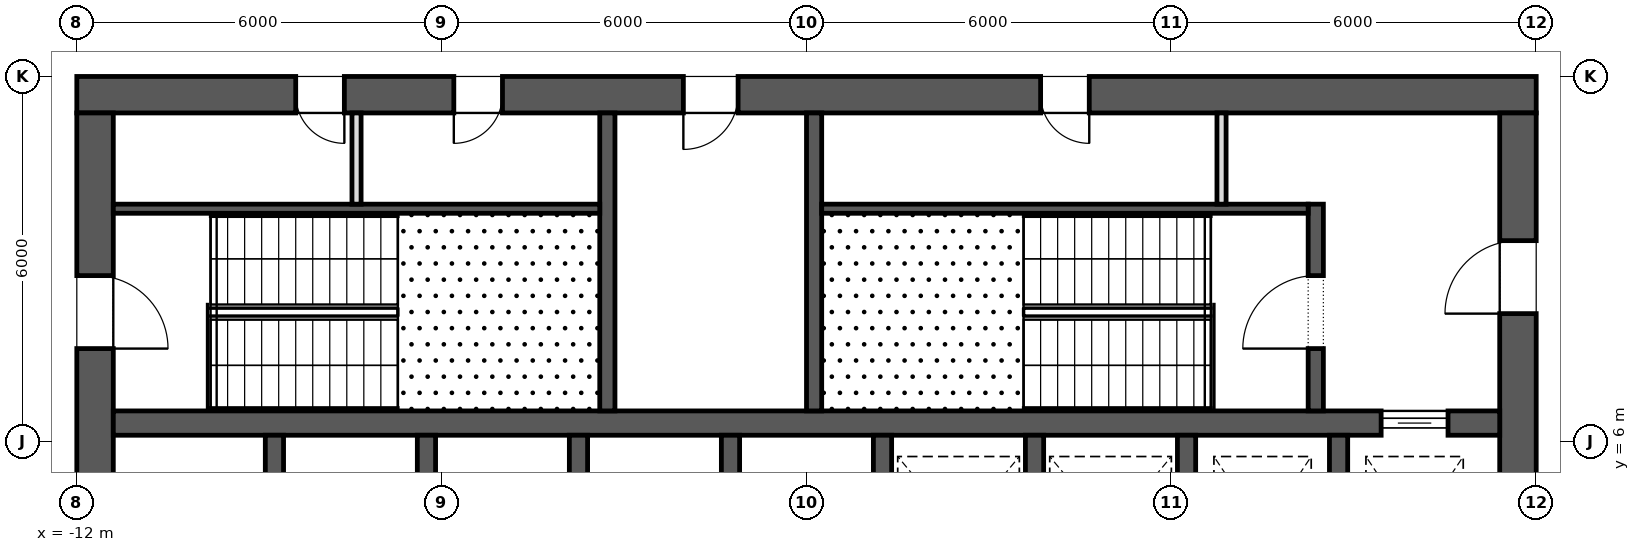
"""IFC4 building model, lengths in metres.
Left out: names, types, materials, properties, quantities, classifications, styles, units other than length and angle.
Written with IfcOpenShell. Run it as: python <this file> out.ifc"""

import sys

from ifc_helpers import new_model, si_unit, direction, frame, frame_2d, origin, place, context, subcontext, project, spatial, rectangle, extrude, element, fill, save


model = new_model("IFC4")
c1 = context("Model", 3, precision=1e-05, world=origin(), true_north=direction((0.0, 1.0)))
c2 = subcontext(c1, "Body", "Model", "MODEL_VIEW")
j1 = project(units=[si_unit("LENGTHUNIT", "METRE"), si_unit("PLANEANGLEUNIT", "RADIAN")], contexts=[c1])
p1 = place(None, origin())
s1 = spatial("IfcSite", under=j1, at=p1, CompositionType="ELEMENT")
p2 = place(p1, origin())
s2 = spatial("IfcBuilding", under=s1, at=p2, CompositionType="ELEMENT")
p3 = place(p2, frame((0.0, 0.0, 82.3)))
s3 = spatial("IfcBuildingStorey", under=s2, at=p3, CompositionType="ELEMENT", Elevation=82.3)
p4 = place(p3, frame((-12.0, 11.7, 0.0), z_axis=(0.0, 0.0, 1.0), x_axis=(1.0, 0.0, 0.0)))
e1 = element("IfcWall", 1, at=p4, inside=s3, PredefinedType="SHEAR", context=c2, shape_type="SweptSolid", body=[
    extrude(rectangle(XDim=24.0, YDim=0.6, at=frame_2d((12.0, 0.0))), origin(), (0.0, 0.0, 1.0), 4.2),
])
p5 = place(p4, frame((9.975, 0.0, 0.0)))
e2 = element("IfcOpeningElement", 2, at=p5, cuts=e1, PredefinedType="OPENING", context=c2, shape_type="SweptSolid", body=[
    extrude(rectangle(XDim=0.9, YDim=2.1, at=frame_2d((0.45, 1.05))), frame((0.0, 0.312, 0.0), z_axis=(0.0, -1.0, 0.0), x_axis=(1.0, 0.0, 0.0)), (0.0, 0.0, 1.0), 0.624),
])
p6 = place(p4, frame((3.6, 0.0, 0.0)))
e3 = element("IfcOpeningElement", 3, at=p6, cuts=e1, PredefinedType="OPENING", context=c2, shape_type="SweptSolid", body=[
    extrude(rectangle(XDim=0.8, YDim=2.1, at=frame_2d((0.4, 1.05))), frame((0.0, 0.312, 0.0), z_axis=(0.0, -1.0, 0.0), x_axis=(1.0, 0.0, 0.0)), (0.0, 0.0, 1.0), 0.624),
])
p7 = place(p4, frame((6.2, 0.0, 0.0)))
e4 = element("IfcOpeningElement", 4, at=p7, cuts=e1, PredefinedType="OPENING", context=c2, shape_type="SweptSolid", body=[
    extrude(rectangle(XDim=0.8, YDim=2.1, at=frame_2d((0.4, 1.05))), frame((0.0, 0.312, 0.0), z_axis=(0.0, -1.0, 0.0), x_axis=(1.0, 0.0, 0.0)), (0.0, 0.0, 1.0), 0.624),
])
p8 = place(p4, frame((15.85, 0.0, 0.0)))
e5 = element("IfcOpeningElement", 5, at=p8, cuts=e1, PredefinedType="OPENING", context=c2, shape_type="SweptSolid", body=[
    extrude(rectangle(XDim=0.8, YDim=2.1, at=frame_2d((0.4, 1.05))), frame((0.0, 0.312, 0.0), z_axis=(0.0, -1.0, 0.0), x_axis=(1.0, 0.0, 0.0)), (0.0, 0.0, 1.0), 0.624),
])
p9 = place(p3, frame((11.7, -11.4, 0.0), z_axis=(0.0, 0.0, 1.0), x_axis=(0.0, 1.0, 0.0)))
e6 = element("IfcWall", 6, at=p9, inside=s3, PredefinedType="SHEAR", context=c2, shape_type="SweptSolid", body=[
    extrude(rectangle(XDim=22.8, YDim=0.6, at=frame_2d((11.4, 0.0))), origin(), (0.0, 0.0, 1.0), 4.2),
])
p10 = place(p9, frame((10.2, 0.0, 0.0)))
e7 = element("IfcOpeningElement", 7, at=p10, cuts=e6, PredefinedType="OPENING", context=c2, shape_type="SweptSolid", body=[
    extrude(rectangle(XDim=2.4, YDim=2.1, at=frame_2d((1.2, 1.05))), frame((0.0, 0.312, 0.0), z_axis=(0.0, -1.0, 0.0), x_axis=(1.0, 0.0, 0.0)), (0.0, 0.0, 1.0), 0.624),
])
p11 = place(p9, frame((19.5, 0.0, 0.0)))
e8 = element("IfcOpeningElement", 8, at=p11, cuts=e6, PredefinedType="OPENING", context=c2, shape_type="SweptSolid", body=[
    extrude(rectangle(XDim=1.2, YDim=2.1, at=frame_2d((0.6, 1.05))), frame((0.0, 0.312, 0.0), z_axis=(0.0, -1.0, 0.0), x_axis=(1.0, 0.0, 0.0)), (0.0, 0.0, 1.0), 0.624),
])
p12 = place(p9, frame((2.1, 0.0, 0.0)))
e9 = element("IfcOpeningElement", 9, at=p12, cuts=e6, PredefinedType="OPENING", context=c2, shape_type="SweptSolid", body=[
    extrude(rectangle(XDim=1.2, YDim=2.1, at=frame_2d((0.6, 1.05))), frame((0.0, 0.312, 0.0), z_axis=(0.0, -1.0, 0.0), x_axis=(1.0, 0.0, 0.0)), (0.0, 0.0, 1.0), 0.624),
])
p13 = place(p3, frame((-11.7, -11.4, 0.0), z_axis=(0.0, 0.0, 1.0), x_axis=(0.0, 1.0, 0.0)))
e10 = element("IfcWall", 10, at=p13, inside=s3, PredefinedType="SHEAR", context=c2, shape_type="SweptSolid", body=[
    extrude(rectangle(XDim=22.8, YDim=0.6, at=frame_2d((11.4, 0.0))), origin(), (0.0, 0.0, 1.0), 4.2),
])
p14 = place(p13, frame((10.2, 0.0, 0.0)))
e11 = element("IfcOpeningElement", 11, at=p14, cuts=e10, PredefinedType="OPENING", context=c2, shape_type="SweptSolid", body=[
    extrude(rectangle(XDim=2.4, YDim=2.1, at=frame_2d((1.2, 1.05))), frame((0.0, 0.312, 0.0), z_axis=(0.0, -1.0, 0.0), x_axis=(1.0, 0.0, 0.0)), (0.0, 0.0, 1.0), 0.624),
])
p15 = place(p13, frame((18.925, 0.0, 0.0)))
e12 = element("IfcOpeningElement", 12, at=p15, cuts=e10, PredefinedType="OPENING", context=c2, shape_type="SweptSolid", body=[
    extrude(rectangle(XDim=1.2, YDim=2.1, at=frame_2d((0.6, 1.05))), frame((0.0, 0.312, 0.0), z_axis=(0.0, -1.0, 0.0), x_axis=(1.0, 0.0, 0.0)), (0.0, 0.0, 1.0), 0.624),
])
p16 = place(p13, frame((2.675, 0.0, 0.0)))
e13 = element("IfcOpeningElement", 13, at=p16, cuts=e10, PredefinedType="OPENING", context=c2, shape_type="SweptSolid", body=[
    extrude(rectangle(XDim=1.2, YDim=2.1, at=frame_2d((0.6, 1.05))), frame((0.0, 0.312, 0.0), z_axis=(0.0, -1.0, 0.0), x_axis=(1.0, 0.0, 0.0)), (0.0, 0.0, 1.0), 0.624),
])
p17 = place(p3, frame((-11.4, 6.3, 0.0), z_axis=(0.0, 0.0, 1.0), x_axis=(1.0, 0.0, 0.0)))
e14 = element("IfcWall", 14, at=p17, inside=s3, PredefinedType="SHEAR", context=c2, shape_type="SweptSolid", body=[
    extrude(rectangle(XDim=22.8, YDim=0.4, at=frame_2d((11.4, 0.0))), origin(), (0.0, 0.0, 1.0), 4.2),
])
p18 = place(p17, frame((20.85, 0.0, 0.0)))
e15 = element("IfcOpeningElement", 15, at=p18, cuts=e14, PredefinedType="OPENING", context=c2, shape_type="SweptSolid", body=[
    extrude(rectangle(XDim=1.1, YDim=2.1, at=frame_2d((0.55, 1.05))), frame((0.0, 0.212, 0.0), z_axis=(0.0, -1.0, 0.0), x_axis=(1.0, 0.0, 0.0)), (0.0, 0.0, 1.0), 0.424),
])
for number, where, z_axis, x_axis in (
    (16, (-8.75, 3.2, 0.0), (0.0, 0.0, 1.0), (0.0, 1.0, 0.0)),
    (17, (-6.25, 3.2, 0.0), (0.0, 0.0, 1.0), (0.0, 1.0, 0.0)),
    (18, (-3.75, 3.2, 0.0), (0.0, 0.0, 1.0), (0.0, 1.0, 0.0)),
    (19, (-1.25, 3.2, 0.0), (0.0, 0.0, 1.0), (0.0, 1.0, 0.0)),
    (20, (1.25, 3.2, 0.0), (0.0, 0.0, 1.0), (0.0, 1.0, 0.0)),
    (21, (3.75, 3.2, 0.0), (0.0, 0.0, 1.0), (0.0, 1.0, 0.0)),
    (22, (6.25, 3.2, 0.0), (0.0, 0.0, 1.0), (0.0, 1.0, 0.0)),
    (23, (8.75, 3.2, 0.0), (0.0, 0.0, 1.0), (0.0, 1.0, 0.0)),
):
    element("IfcWall", number, at=place(p3, frame(where, z_axis=z_axis, x_axis=x_axis)), inside=s3, PredefinedType="SHEAR", context=c2, shape_type="SweptSolid", body=[
        extrude(rectangle(XDim=2.9, YDim=0.3, at=frame_2d((1.45, 0.0))), origin(), (0.0, 0.0, 1.0), 4.2),
    ])
for number, where, z_axis, x_axis in (
    (24, (-3.275, 6.5, 0.0), (0.0, 0.0, 1.0), (0.0, 1.0, 0.0)),
    (25, (0.125, 6.5, 0.0), (0.0, 0.0, 1.0), (0.0, 1.0, 0.0)),
):
    element("IfcWall", number, at=place(p3, frame(where, z_axis=z_axis, x_axis=x_axis)), inside=s3, PredefinedType="SHEAR", context=c2, shape_type="SweptSolid", body=[
        extrude(rectangle(XDim=4.9, YDim=0.25, at=frame_2d((2.45, 0.0))), origin(), (0.0, 0.0, 1.0), 3.9),
    ])
p19 = place(p3, frame((8.375, 6.5, 0.0), z_axis=(0.0, 0.0, 1.0), x_axis=(0.0, 1.0, 0.0)))
e26 = element("IfcWall", 26, at=p19, inside=s3, PredefinedType="SHEAR", context=c2, shape_type="SweptSolid", body=[
    extrude(rectangle(XDim=3.4, YDim=0.25, at=frame_2d((1.7, 0.0))), origin(), (0.0, 0.0, 1.0), 3.9),
])
p20 = place(p19, frame((1.025, 0.0, 0.0)))
e27 = element("IfcOpeningElement", 27, at=p20, cuts=e26, PredefinedType="OPENING", context=c2, shape_type="SweptSolid", body=[
    extrude(rectangle(XDim=1.2, YDim=2.1, at=frame_2d((0.6, 1.05))), frame((0.0, 0.137, 0.0), z_axis=(0.0, -1.0, 0.0), x_axis=(1.0, 0.0, 0.0)), (0.0, 0.0, 1.0), 0.274),
])
for number, where, z_axis, x_axis in (
    (28, (-11.4, 9.825, 0.0), (0.0, 0.0, 1.0), (1.0, 0.0, 0.0)),
    (29, (0.25, 9.825, 0.0), (0.0, 0.0, 1.0), (1.0, 0.0, 0.0)),
):
    element("IfcWall", number, at=place(p3, frame(where, z_axis=z_axis, x_axis=x_axis)), inside=s3, PredefinedType="SHEAR", context=c2, shape_type="SweptSolid", body=[
        extrude(rectangle(XDim=8.0, YDim=0.15, at=frame_2d((4.0, 0.0))), origin(), (0.0, 0.0, 1.0), 3.9),
    ])
for number, where, z_axis, x_axis in (
    (30, (-7.4, 9.9, 0.0), (0.0, 0.0, 1.0), (0.0, 1.0, 0.0)),
    (31, (6.825, 9.9, 0.0), (0.0, 0.0, 1.0), (0.0, 1.0, 0.0)),
):
    element("IfcWall", number, at=place(p3, frame(where, z_axis=z_axis, x_axis=x_axis)), inside=s3, PredefinedType="PARTITIONING", context=c2, shape_type="SweptSolid", body=[
        extrude(rectangle(XDim=1.5, YDim=0.15, at=frame_2d((0.75, 0.0))), origin(), (0.0, 0.0, 1.0), 3.9),
    ])
p21 = place(p18, origin())
e32 = element("IfcDoor", 32, at=p21, inside=s3, OperationType="SLIDING_TO_LEFT", PredefinedType="DOOR", context=c2, shape_type="SweptSolid", body=[
    extrude(rectangle(XDim=1.1, YDim=2.1, at=frame_2d((0.55, 1.05))), frame((0.0, 0.025, 0.0), z_axis=(0.0, -1.0, 0.0), x_axis=(1.0, 0.0, 0.0)), (0.0, 0.0, 1.0), 0.05),
])
fill(e15, e32)
p22 = place(p15, frame((1.2, 0.0, 0.0), z_axis=(0.0, 0.0, 1.0), x_axis=(-1.0, 0.0, 0.0)))
e33 = element("IfcDoor", 33, at=p22, inside=s3, OperationType="SINGLE_SWING_LEFT", PredefinedType="DOOR", context=c2, shape_type="SweptSolid", body=[
    extrude(rectangle(XDim=1.2, YDim=2.1, at=frame_2d((0.6, 1.05))), frame((0.0, 0.025, 0.0), z_axis=(0.0, -1.0, 0.0), x_axis=(1.0, 0.0, 0.0)), (0.0, 0.0, 1.0), 0.05),
])
fill(e12, e33)
p23 = place(p20, origin())
e34 = element("IfcDoor", 34, at=p23, inside=s3, OperationType="SINGLE_SWING_RIGHT", PredefinedType="DOOR", context=c2, shape_type="SweptSolid", body=[
    extrude(rectangle(XDim=1.2, YDim=2.1, at=frame_2d((0.6, 1.05))), frame((0.0, 0.025, 0.0), z_axis=(0.0, -1.0, 0.0), x_axis=(1.0, 0.0, 0.0)), (0.0, 0.0, 1.0), 0.05),
])
fill(e27, e34)
p24 = place(p11, origin())
e35 = element("IfcDoor", 35, at=p24, inside=s3, OperationType="SINGLE_SWING_RIGHT", PredefinedType="DOOR", context=c2, shape_type="SweptSolid", body=[
    extrude(rectangle(XDim=1.2, YDim=2.1, at=frame_2d((0.6, 1.05))), frame((0.0, 0.025, 0.0), z_axis=(0.0, -1.0, 0.0), x_axis=(1.0, 0.0, 0.0)), (0.0, 0.0, 1.0), 0.05),
])
fill(e8, e35)
p25 = place(p5, frame((0.9, 0.0, 0.0), z_axis=(0.0, 0.0, 1.0), x_axis=(-1.0, 0.0, 0.0)))
e36 = element("IfcDoor", 36, at=p25, inside=s3, OperationType="SINGLE_SWING_LEFT", PredefinedType="DOOR", context=c2, shape_type="SweptSolid", body=[
    extrude(rectangle(XDim=0.9, YDim=2.1, at=frame_2d((0.45, 1.05))), frame((0.0, 0.025, 0.0), z_axis=(0.0, -1.0, 0.0), x_axis=(1.0, 0.0, 0.0)), (0.0, 0.0, 1.0), 0.05),
])
fill(e2, e36)
p26 = place(p6, frame((0.8, 0.0, 0.0), z_axis=(0.0, 0.0, 1.0), x_axis=(-1.0, 0.0, 0.0)))
e37 = element("IfcDoor", 37, at=p26, inside=s3, OperationType="SINGLE_SWING_RIGHT", PredefinedType="DOOR", context=c2, shape_type="SweptSolid", body=[
    extrude(rectangle(XDim=0.8, YDim=2.1, at=frame_2d((0.4, 1.05))), frame((0.0, 0.025, 0.0), z_axis=(0.0, -1.0, 0.0), x_axis=(1.0, 0.0, 0.0)), (0.0, 0.0, 1.0), 0.05),
])
fill(e3, e37)
p27 = place(p7, frame((0.8, 0.0, 0.0), z_axis=(0.0, 0.0, 1.0), x_axis=(-1.0, 0.0, 0.0)))
e38 = element("IfcDoor", 38, at=p27, inside=s3, OperationType="SINGLE_SWING_LEFT", PredefinedType="DOOR", context=c2, shape_type="SweptSolid", body=[
    extrude(rectangle(XDim=0.8, YDim=2.1, at=frame_2d((0.4, 1.05))), frame((0.0, 0.025, 0.0), z_axis=(0.0, -1.0, 0.0), x_axis=(1.0, 0.0, 0.0)), (0.0, 0.0, 1.0), 0.05),
])
fill(e4, e38)
p28 = place(p8, frame((0.8, 0.0, 0.0), z_axis=(0.0, 0.0, 1.0), x_axis=(-1.0, 0.0, 0.0)))
e39 = element("IfcDoor", 39, at=p28, inside=s3, OperationType="SINGLE_SWING_RIGHT", PredefinedType="DOOR", context=c2, shape_type="SweptSolid", body=[
    extrude(rectangle(XDim=0.8, YDim=2.1, at=frame_2d((0.4, 1.05))), frame((0.0, 0.025, 0.0), z_axis=(0.0, -1.0, 0.0), x_axis=(1.0, 0.0, 0.0)), (0.0, 0.0, 1.0), 0.05),
])
fill(e5, e39)
save(model, sys.argv[1])
